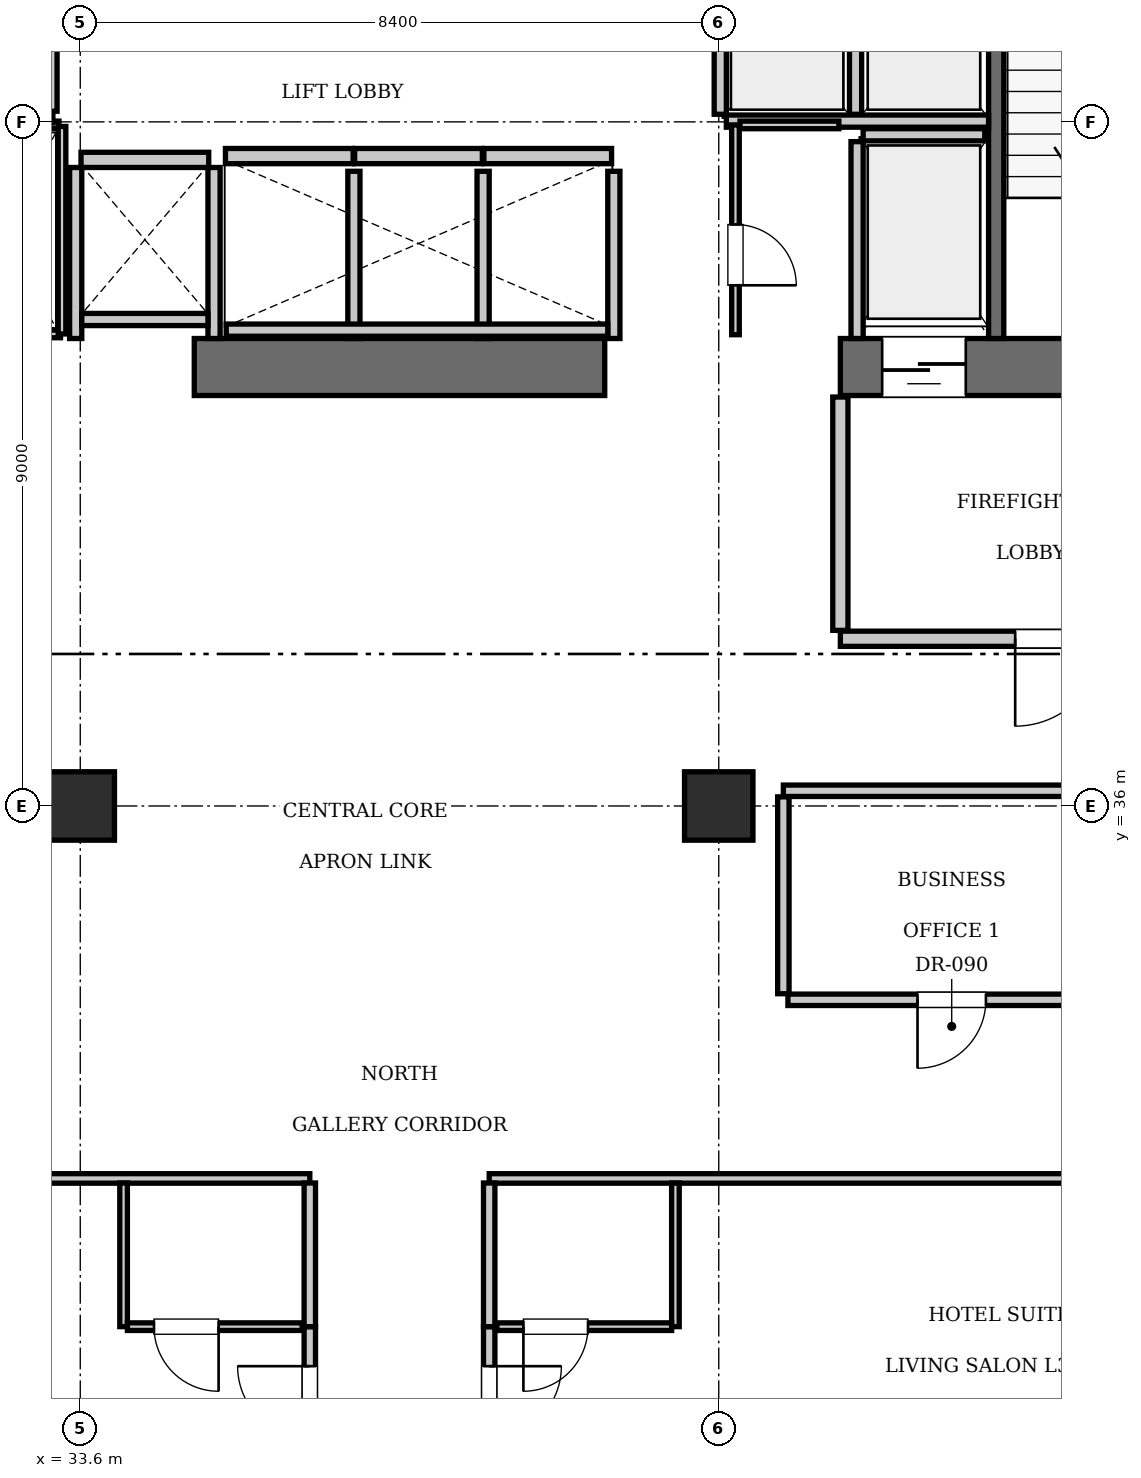
"""IFC4 building model, lengths in metres.
Left out: names, types, materials, properties, quantities, classifications, styles, units other than length and angle.
Written with IfcOpenShell. Run it as: python <this file> out.ifc"""

import sys

from ifc_helpers import new_model, si_unit, direction, frame, frame_2d, origin, origin_2d, place, context, subcontext, project, spatial, rectangle, extrude, element, fill, save


model = new_model("IFC4")
c1 = context("Model", 3, precision=1e-05, world=origin(), true_north=direction((0.0, 1.0)))
c2 = subcontext(c1, "Body", "Model", "MODEL_VIEW")
j1 = project(units=[si_unit("LENGTHUNIT", "METRE"), si_unit("PLANEANGLEUNIT", "RADIAN")], contexts=[c1])
p1 = place(None, origin())
s1 = spatial("IfcSite", under=j1, at=p1, CompositionType="ELEMENT")
p2 = place(p1, origin())
s2 = spatial("IfcBuilding", under=s1, at=p2, CompositionType="ELEMENT")
p3 = place(p2, frame((0.0, 0.0, 131.25)))
s3 = spatial("IfcBuildingStorey", under=s2, at=p3, CompositionType="ELEMENT", Elevation=131.25)
p4 = place(p3, frame((35.1, 41.775, 0.0), z_axis=(0.0, 0.0, 1.0), x_axis=(1.0, 0.0, 0.0)))
e1 = element("IfcWall", 1, at=p4, inside=s3, PredefinedType="SHEAR", context=c2, shape_type="SweptSolid", body=[
    extrude(rectangle(XDim=5.4, YDim=0.75, at=frame_2d((2.7, 0.0))), origin(), (0.0, 0.0, 1.0), 3.85),
])
p5 = place(p3, frame((43.6, 41.775, 0.0), z_axis=(0.0, 0.0, 1.0), x_axis=(1.0, 0.0, 0.0)))
e2 = element("IfcWall", 2, at=p5, inside=s3, PredefinedType="SHEAR", context=c2, shape_type="SweptSolid", body=[
    extrude(rectangle(XDim=6.8, YDim=0.75, at=frame_2d((3.4, 0.0))), origin(), (0.0, 0.0, 1.0), 3.85),
])
p6 = place(p5, frame((3.9, 0.0, 0.0)))
e3 = element("IfcOpeningElement", 3, at=p6, cuts=e2, PredefinedType="OPENING", context=c2, shape_type="SweptSolid", body=[
    extrude(rectangle(XDim=1.15, YDim=2.15, at=frame_2d((0.575, 1.075))), frame((0.0, 0.385, 0.0), z_axis=(0.0, -1.0, 0.0), x_axis=(1.0, 0.0, 0.0)), (0.0, 0.0, 1.0), 0.77),
])
p7 = place(p5, frame((0.55, 0.0, 0.0)))
e4 = element("IfcOpeningElement", 4, at=p7, cuts=e2, PredefinedType="OPENING", context=c2, shape_type="SweptSolid", body=[
    extrude(rectangle(XDim=1.1, YDim=2.2, at=frame_2d((0.55, 1.1))), frame((0.0, 0.385, 0.0), z_axis=(0.0, -1.0, 0.0), x_axis=(1.0, 0.0, 0.0)), (0.0, 0.0, 1.0), 0.77),
])
for number, where, z_axis, x_axis in (
    (5, (33.6, 36.0, 0.0), (0.0, 0.0, 1.0), (1.0, 0.0, 0.0)),
    (6, (42.0, 36.0, 0.0), (0.0, 0.0, 1.0), (1.0, 0.0, 0.0)),
):
    element("IfcColumn", number, at=place(p3, frame(where, z_axis=z_axis, x_axis=x_axis)), inside=s3, PredefinedType="COLUMN", context=c2, shape_type="SweptSolid", body=[
        extrude(rectangle(XDim=0.9, YDim=0.9, at=origin_2d()), origin(), (0.0, 0.0, 1.0), 3.85),
    ])
p8 = place(p3, frame((45.65, 42.15, 0.0), z_axis=(0.0, 0.0, 1.0), x_axis=(0.0, 1.0, 0.0)))
e7 = element("IfcWall", 7, at=p8, inside=s3, PredefinedType="SOLIDWALL", context=c2, shape_type="SweptSolid", body=[
    extrude(rectangle(XDim=9.0, YDim=0.2, at=frame_2d((4.5, 0.0))), origin(), (0.0, 0.0, 1.0), 3.61),
])
for number, where, z_axis, x_axis in (
    (8, (35.51, 44.55, 0.0), (0.0, 0.0, 1.0), (1.0, 0.0, 0.0)),
    (9, (37.21, 44.55, 0.0), (0.0, 0.0, 1.0), (1.0, 0.0, 0.0)),
):
    element("IfcWall", number, at=place(p3, frame(where, z_axis=z_axis, x_axis=x_axis)), inside=s3, PredefinedType="SOLIDWALL", context=c2, shape_type="SweptSolid", body=[
        extrude(rectangle(XDim=1.68, YDim=0.2, at=frame_2d((0.84, 0.0))), origin(), (0.0, 0.0, 1.0), 3.61),
    ])
p9 = place(p3, frame((38.91, 44.55, 0.0), z_axis=(0.0, 0.0, 1.0), x_axis=(1.0, 0.0, 0.0)))
e10 = element("IfcWall", 10, at=p9, inside=s3, PredefinedType="SOLIDWALL", context=c2, shape_type="SweptSolid", body=[
    extrude(rectangle(XDim=1.68, YDim=0.2, at=frame_2d((0.84, 0.0))), origin(), (0.0, 0.0, 1.0), 3.61),
])
p10 = place(p3, frame((33.61, 44.5, 0.0), z_axis=(0.0, 0.0, 1.0), x_axis=(1.0, 0.0, 0.0)))
e11 = element("IfcWall", 11, at=p10, inside=s3, PredefinedType="SOLIDWALL", context=c2, shape_type="SweptSolid", body=[
    extrude(rectangle(XDim=1.68, YDim=0.2, at=frame_2d((0.84, 0.0))), origin(), (0.0, 0.0, 1.0), 3.61),
])
p11 = place(p3, frame((43.9, 44.83, 0.0), z_axis=(0.0, 0.0, 1.0), x_axis=(1.0, 0.0, 0.0)))
e12 = element("IfcWall", 12, at=p11, inside=s3, PredefinedType="SOLIDWALL", context=c2, shape_type="SweptSolid", body=[
    extrude(rectangle(XDim=1.6, YDim=0.16, at=frame_2d((0.8, 0.0))), origin(), (0.0, 0.0, 1.0), 3.61),
])
p12 = place(p3, frame((43.82, 42.15, 0.0), z_axis=(0.0, 0.0, 1.0), x_axis=(0.0, 1.0, 0.0)))
e13 = element("IfcWall", 13, at=p12, inside=s3, PredefinedType="SOLIDWALL", context=c2, shape_type="SweptSolid", body=[
    extrude(rectangle(XDim=2.59, YDim=0.16, at=frame_2d((1.295, 0.0))), origin(), (0.0, 0.0, 1.0), 3.61),
])
for number, where, z_axis, x_axis in (
    (14, (42.02, 45.1, 0.0), (0.0, 0.0, 1.0), (0.0, 1.0, 0.0)),
    (15, (43.8, 45.1, 0.0), (0.0, 0.0, 1.0), (0.0, 1.0, 0.0)),
):
    element("IfcWall", number, at=place(p3, frame(where, z_axis=z_axis, x_axis=x_axis)), inside=s3, PredefinedType="SOLIDWALL", context=c2, shape_type="SweptSolid", body=[
        extrude(rectangle(XDim=1.95, YDim=0.16, at=frame_2d((0.975, 0.0))), origin(), (0.0, 0.0, 1.0), 3.61),
    ])
p13 = place(p3, frame((42.1, 45.01, 0.0), z_axis=(0.0, 0.0, 1.0), x_axis=(1.0, 0.0, 0.0)))
e16 = element("IfcWall", 16, at=p13, inside=s3, PredefinedType="SOLIDWALL", context=c2, shape_type="SweptSolid", body=[
    extrude(rectangle(XDim=3.45, YDim=0.16, at=frame_2d((1.725, 0.0))), origin(), (0.0, 0.0, 1.0), 3.61),
])
for number, where, z_axis, x_axis in (
    (17, (37.2, 42.15, 0.0), (0.0, 0.0, 1.0), (0.0, 1.0, 0.0)),
    (18, (38.9, 42.15, 0.0), (0.0, 0.0, 1.0), (0.0, 1.0, 0.0)),
    (19, (40.62, 42.15, 0.0), (0.0, 0.0, 1.0), (0.0, 1.0, 0.0)),
):
    element("IfcWall", number, at=place(p3, frame(where, z_axis=z_axis, x_axis=x_axis)), inside=s3, PredefinedType="SOLIDWALL", context=c2, shape_type="SweptSolid", body=[
        extrude(rectangle(XDim=2.2, YDim=0.16, at=frame_2d((1.1, 0.0))), origin(), (0.0, 0.0, 1.0), 3.61),
    ])
p14 = place(p3, frame((35.52, 42.26, 0.0), z_axis=(0.0, 0.0, 1.0), x_axis=(1.0, 0.0, 0.0)))
e20 = element("IfcWall", 20, at=p14, inside=s3, PredefinedType="SOLIDWALL", context=c2, shape_type="SweptSolid", body=[
    extrude(rectangle(XDim=5.02, YDim=0.16, at=frame_2d((2.51, 0.0))), origin(), (0.0, 0.0, 1.0), 3.61),
])
for number, where, z_axis, x_axis in (
    (21, (33.54, 42.15, 0.0), (0.0, 0.0, 1.0), (0.0, 1.0, 0.0)),
    (22, (35.36, 42.15, 0.0), (0.0, 0.0, 1.0), (0.0, 1.0, 0.0)),
):
    element("IfcWall", number, at=place(p3, frame(where, z_axis=z_axis, x_axis=x_axis)), inside=s3, PredefinedType="SOLIDWALL", context=c2, shape_type="SweptSolid", body=[
        extrude(rectangle(XDim=2.25, YDim=0.16, at=frame_2d((1.125, 0.0))), origin(), (0.0, 0.0, 1.0), 3.61),
    ])
p15 = place(p3, frame((33.62, 42.4, 0.0), z_axis=(0.0, 0.0, 1.0), x_axis=(1.0, 0.0, 0.0)))
e23 = element("IfcWall", 23, at=p15, inside=s3, PredefinedType="SOLIDWALL", context=c2, shape_type="SweptSolid", body=[
    extrude(rectangle(XDim=1.66, YDim=0.16, at=frame_2d((0.83, 0.0))), origin(), (0.0, 0.0, 1.0), 3.61),
])
p16 = place(p3, frame((43.6, 38.2, 0.0), z_axis=(0.0, 0.0, 1.0), x_axis=(1.0, 0.0, 0.0)))
e24 = element("IfcWall", 24, at=p16, inside=s3, PredefinedType="PARTITIONING", context=c2, shape_type="SweptSolid", body=[
    extrude(rectangle(XDim=5.8, YDim=0.2, at=frame_2d((2.9, 0.0))), origin(), (0.0, 0.0, 1.0), 3.61),
])
p17 = place(p16, frame((2.3, 0.0, 0.0)))
e25 = element("IfcOpeningElement", 25, at=p17, cuts=e24, PredefinedType="OPENING", context=c2, shape_type="SweptSolid", body=[
    extrude(rectangle(XDim=1.15, YDim=2.15, at=frame_2d((0.575, 1.075))), frame((0.0, 0.11, 0.0), z_axis=(0.0, -1.0, 0.0), x_axis=(1.0, 0.0, 0.0)), (0.0, 0.0, 1.0), 0.22),
])
p18 = place(p3, frame((43.6, 38.31, 0.0), z_axis=(0.0, 0.0, 1.0), x_axis=(0.0, 1.0, 0.0)))
e26 = element("IfcWall", 26, at=p18, inside=s3, PredefinedType="PARTITIONING", context=c2, shape_type="SweptSolid", body=[
    extrude(rectangle(XDim=3.07, YDim=0.2, at=frame_2d((1.535, 0.0))), origin(), (0.0, 0.0, 1.0), 3.61),
])
p19 = place(p3, frame((32.02, 42.21, 0.0), z_axis=(0.0, 0.0, 1.0), x_axis=(1.0, 0.0, 0.0)))
e27 = element("IfcWall", 27, at=p19, inside=s3, PredefinedType="PARTITIONING", context=c2, shape_type="SweptSolid", body=[
    extrude(rectangle(XDim=1.32, YDim=0.1, at=frame_2d((0.66, 0.0))), origin(), (0.0, 0.0, 1.0), 3.61),
])
p20 = place(p19, frame((0.24, 0.0, 0.0)))
e28 = element("IfcOpeningElement", 28, at=p20, cuts=e27, PredefinedType="OPENING", context=c2, shape_type="SweptSolid", body=[
    extrude(rectangle(XDim=0.8, YDim=2.05, at=frame_2d((0.4, 1.025))), frame((0.0, 0.06, 0.0), z_axis=(0.0, -1.0, 0.0), x_axis=(1.0, 0.0, 0.0)), (0.0, 0.0, 1.0), 0.12),
])
p21 = place(p3, frame((31.84, 44.96, 0.0), z_axis=(0.0, 0.0, 1.0), x_axis=(1.0, 0.0, 0.0)))
e29 = element("IfcWall", 29, at=p21, inside=s3, PredefinedType="PARTITIONING", context=c2, shape_type="SweptSolid", body=[
    extrude(rectangle(XDim=1.48, YDim=0.1, at=frame_2d((0.74, 0.0))), origin(), (0.0, 0.0, 1.0), 3.61),
])
p22 = place(p3, frame((33.36, 42.21, 0.0), z_axis=(0.0, 0.0, 1.0), x_axis=(0.0, 1.0, 0.0)))
e30 = element("IfcWall", 30, at=p22, inside=s3, PredefinedType="PARTITIONING", context=c2, shape_type="SweptSolid", body=[
    extrude(rectangle(XDim=2.73, YDim=0.1, at=frame_2d((1.365, 0.0))), origin(), (0.0, 0.0, 1.0), 3.61),
])
p23 = place(p3, frame((42.22, 42.2, 0.0), z_axis=(0.0, 0.0, 1.0), x_axis=(0.0, 1.0, 0.0)))
e31 = element("IfcWall", 31, at=p23, inside=s3, PredefinedType="PARTITIONING", context=c2, shape_type="SweptSolid", body=[
    extrude(rectangle(XDim=2.76, YDim=0.1, at=frame_2d((1.38, 0.0))), origin(), (0.0, 0.0, 1.0), 3.61),
])
p24 = place(p23, frame((0.65, 0.0, 0.0)))
e32 = element("IfcOpeningElement", 32, at=p24, cuts=e31, PredefinedType="OPENING", context=c2, shape_type="SweptSolid", body=[
    extrude(rectangle(XDim=0.8, YDim=2.05, at=frame_2d((0.4, 1.025))), frame((0.0, 0.06, 0.0), z_axis=(0.0, -1.0, 0.0), x_axis=(1.0, 0.0, 0.0)), (0.0, 0.0, 1.0), 0.12),
])
p25 = place(p3, frame((42.28, 44.96, 0.0), z_axis=(0.0, 0.0, 1.0), x_axis=(1.0, 0.0, 0.0)))
e33 = element("IfcWall", 33, at=p25, inside=s3, PredefinedType="PARTITIONING", context=c2, shape_type="SweptSolid", body=[
    extrude(rectangle(XDim=1.3, YDim=0.1, at=frame_2d((0.65, 0.0))), origin(), (0.0, 0.0, 1.0), 3.61),
])
p26 = place(p3, frame((30.06, 45.06, 0.0), z_axis=(0.0, 0.0, 1.0), x_axis=(1.0, 0.0, 0.0)))
e34 = element("IfcWall", 34, at=p26, inside=s3, PredefinedType="PARTITIONING", context=c2, shape_type="SweptSolid", body=[
    extrude(rectangle(XDim=3.18, YDim=0.15, at=frame_2d((1.59, 0.0))), origin(), (0.0, 0.0, 1.0), 3.61),
])
p27 = place(p3, frame((33.22, 45.14, 0.0), z_axis=(0.0, 0.0, 1.0), x_axis=(0.0, 1.0, 0.0)))
e35 = element("IfcWall", 35, at=p27, inside=s3, PredefinedType="PARTITIONING", context=c2, shape_type="SweptSolid", body=[
    extrude(rectangle(XDim=4.16, YDim=0.15, at=frame_2d((2.08, 0.0))), origin(), (0.0, 0.0, 1.0), 3.61),
])
p28 = place(p3, frame((42.85, 36.2, 0.0), z_axis=(0.0, 0.0, 1.0), x_axis=(1.0, 0.0, 0.0)))
e36 = element("IfcWall", 36, at=p28, inside=s3, PredefinedType="PARTITIONING", context=c2, shape_type="SweptSolid", body=[
    extrude(rectangle(XDim=4.43, YDim=0.15, at=frame_2d((2.215, 0.0))), origin(), (0.0, 0.0, 1.0), 3.61),
])
p29 = place(p3, frame((42.85, 33.53, 0.0), z_axis=(0.0, 0.0, 1.0), x_axis=(0.0, 1.0, 0.0)))
e37 = element("IfcWall", 37, at=p29, inside=s3, PredefinedType="PARTITIONING", context=c2, shape_type="SweptSolid", body=[
    extrude(rectangle(XDim=2.59, YDim=0.15, at=frame_2d((1.295, 0.0))), origin(), (0.0, 0.0, 1.0), 3.61),
])
p30 = place(p3, frame((42.91, 33.45, 0.0), z_axis=(0.0, 0.0, 1.0), x_axis=(1.0, 0.0, 0.0)))
e38 = element("IfcWall", 38, at=p30, inside=s3, PredefinedType="PARTITIONING", context=c2, shape_type="SweptSolid", body=[
    extrude(rectangle(XDim=4.31, YDim=0.15, at=frame_2d((2.155, 0.0))), origin(), (0.0, 0.0, 1.0), 3.61),
])
p31 = place(p30, frame((1.705, 0.0, 0.0)))
e39 = element("IfcOpeningElement", 39, at=p31, cuts=e38, PredefinedType="OPENING", context=c2, shape_type="SweptSolid", body=[
    extrude(rectangle(XDim=0.9, YDim=2.1, at=frame_2d((0.45, 1.05))), frame((0.0, 0.085, 0.0), z_axis=(0.0, -1.0, 0.0), x_axis=(1.0, 0.0, 0.0)), (0.0, 0.0, 1.0), 0.17),
])
p32 = place(p3, frame((13.2, 31.1, 0.0), z_axis=(0.0, 0.0, 1.0), x_axis=(1.0, 0.0, 0.0)))
e40 = element("IfcWall", 40, at=p32, inside=s3, PredefinedType="PARTITIONING", context=c2, shape_type="SweptSolid", body=[
    extrude(rectangle(XDim=23.42, YDim=0.125, at=frame_2d((11.71, 0.0))), origin(), (0.0, 0.0, 1.0), 3.61),
])
p33 = place(p3, frame((38.98, 31.1, 0.0), z_axis=(0.0, 0.0, 1.0), x_axis=(1.0, 0.0, 0.0)))
e41 = element("IfcWall", 41, at=p33, inside=s3, PredefinedType="PARTITIONING", context=c2, shape_type="SweptSolid", body=[
    extrude(rectangle(XDim=23.42, YDim=0.125, at=frame_2d((11.71, 0.0))), origin(), (0.0, 0.0, 1.0), 3.61),
])
p34 = place(p3, frame((36.62, 27.16, 0.0), z_axis=(0.0, 0.0, 1.0), x_axis=(0.0, 1.0, 0.0)))
e42 = element("IfcWall", 42, at=p34, inside=s3, PredefinedType="PARTITIONING", context=c2, shape_type="SweptSolid", body=[
    extrude(rectangle(XDim=1.99, YDim=0.15, at=frame_2d((0.995, 0.0))), origin(), (0.0, 0.0, 1.0), 3.61),
])
p35 = place(p34, frame((0.52, 0.0, 0.0)))
e43 = element("IfcOpeningElement", 43, at=p35, cuts=e42, PredefinedType="OPENING", context=c2, shape_type="SweptSolid", body=[
    extrude(rectangle(XDim=0.95, YDim=2.15, at=frame_2d((0.475, 1.075))), frame((0.0, 0.085, 0.0), z_axis=(0.0, -1.0, 0.0), x_axis=(1.0, 0.0, 0.0)), (0.0, 0.0, 1.0), 0.17),
])
p36 = place(p3, frame((36.62, 29.15, 0.0), z_axis=(0.0, 0.0, 1.0), x_axis=(0.0, 1.0, 0.0)))
e44 = element("IfcWall", 44, at=p36, inside=s3, PredefinedType="PARTITIONING", context=c2, shape_type="SweptSolid", body=[
    extrude(rectangle(XDim=1.89, YDim=0.15, at=frame_2d((0.945, 0.0))), origin(), (0.0, 0.0, 1.0), 3.61),
])
p37 = place(p3, frame((34.17, 29.15, 0.0), z_axis=(0.0, 0.0, 1.0), x_axis=(0.0, 1.0, 0.0)))
e45 = element("IfcWall", 45, at=p37, inside=s3, PredefinedType="PARTITIONING", context=c2, shape_type="SweptSolid", body=[
    extrude(rectangle(XDim=1.89, YDim=0.1, at=frame_2d((0.945, 0.0))), origin(), (0.0, 0.0, 1.0), 3.61),
])
p38 = place(p3, frame((34.22, 29.15, 0.0), z_axis=(0.0, 0.0, 1.0), x_axis=(1.0, 0.0, 0.0)))
e46 = element("IfcWall", 46, at=p38, inside=s3, PredefinedType="PARTITIONING", context=c2, shape_type="SweptSolid", body=[
    extrude(rectangle(XDim=2.3, YDim=0.1, at=frame_2d((1.15, 0.0))), origin(), (0.0, 0.0, 1.0), 3.61),
])
p39 = place(p38, frame((0.35, 0.0, 0.0)))
e47 = element("IfcOpeningElement", 47, at=p39, cuts=e46, PredefinedType="OPENING", context=c2, shape_type="SweptSolid", body=[
    extrude(rectangle(XDim=0.85, YDim=2.1, at=frame_2d((0.425, 1.05))), frame((0.0, 0.06, 0.0), z_axis=(0.0, -1.0, 0.0), x_axis=(1.0, 0.0, 0.0)), (0.0, 0.0, 1.0), 0.12),
])
p40 = place(p3, frame((38.98, 27.16, 0.0), z_axis=(0.0, 0.0, 1.0), x_axis=(0.0, 1.0, 0.0)))
e48 = element("IfcWall", 48, at=p40, inside=s3, PredefinedType="PARTITIONING", context=c2, shape_type="SweptSolid", body=[
    extrude(rectangle(XDim=1.99, YDim=0.15, at=frame_2d((0.995, 0.0))), origin(), (0.0, 0.0, 1.0), 3.61),
])
p41 = place(p40, frame((0.52, 0.0, 0.0)))
e49 = element("IfcOpeningElement", 49, at=p41, cuts=e48, PredefinedType="OPENING", context=c2, shape_type="SweptSolid", body=[
    extrude(rectangle(XDim=0.95, YDim=2.15, at=frame_2d((0.475, 1.075))), frame((0.0, 0.085, 0.0), z_axis=(0.0, -1.0, 0.0), x_axis=(1.0, 0.0, 0.0)), (0.0, 0.0, 1.0), 0.17),
])
p42 = place(p3, frame((38.98, 29.15, 0.0), z_axis=(0.0, 0.0, 1.0), x_axis=(0.0, 1.0, 0.0)))
e50 = element("IfcWall", 50, at=p42, inside=s3, PredefinedType="PARTITIONING", context=c2, shape_type="SweptSolid", body=[
    extrude(rectangle(XDim=1.89, YDim=0.15, at=frame_2d((0.945, 0.0))), origin(), (0.0, 0.0, 1.0), 3.61),
])
p43 = place(p3, frame((41.43, 29.15, 0.0), z_axis=(0.0, 0.0, 1.0), x_axis=(0.0, 1.0, 0.0)))
e51 = element("IfcWall", 51, at=p43, inside=s3, PredefinedType="PARTITIONING", context=c2, shape_type="SweptSolid", body=[
    extrude(rectangle(XDim=1.89, YDim=0.1, at=frame_2d((0.945, 0.0))), origin(), (0.0, 0.0, 1.0), 3.61),
])
p44 = place(p3, frame((39.08, 29.15, 0.0), z_axis=(0.0, 0.0, 1.0), x_axis=(1.0, 0.0, 0.0)))
e52 = element("IfcWall", 52, at=p44, inside=s3, PredefinedType="PARTITIONING", context=c2, shape_type="SweptSolid", body=[
    extrude(rectangle(XDim=2.3, YDim=0.1, at=frame_2d((1.15, 0.0))), origin(), (0.0, 0.0, 1.0), 3.61),
])
p45 = place(p44, frame((0.35, 0.0, 0.0)))
e53 = element("IfcOpeningElement", 53, at=p45, cuts=e52, PredefinedType="OPENING", context=c2, shape_type="SweptSolid", body=[
    extrude(rectangle(XDim=0.85, YDim=2.1, at=frame_2d((0.425, 1.05))), frame((0.0, 0.06, 0.0), z_axis=(0.0, -1.0, 0.0), x_axis=(1.0, 0.0, 0.0)), (0.0, 0.0, 1.0), 0.12),
])
p46 = place(p7, frame((1.1, 0.0, 0.0), z_axis=(0.0, 0.0, 1.0), x_axis=(-1.0, 0.0, 0.0)))
e54 = element("IfcDoor", 54, at=p46, inside=s3, OperationType="SLIDING_TO_LEFT", PredefinedType="DOOR", context=c2, shape_type="SweptSolid", body=[
    extrude(rectangle(XDim=1.1, YDim=2.2, at=frame_2d((0.55, 1.1))), frame((0.0, 0.025, 0.0), z_axis=(0.0, -1.0, 0.0), x_axis=(1.0, 0.0, 0.0)), (0.0, 0.0, 1.0), 0.05),
])
fill(e4, e54)
p47 = place(p17, frame((1.15, 0.0, 0.0), z_axis=(0.0, 0.0, 1.0), x_axis=(-1.0, 0.0, 0.0)))
e55 = element("IfcDoor", 55, at=p47, inside=s3, OperationType="SINGLE_SWING_RIGHT", PredefinedType="DOOR", context=c2, shape_type="SweptSolid", body=[
    extrude(rectangle(XDim=1.15, YDim=2.15, at=frame_2d((0.575, 1.075))), frame((0.0, 0.025, 0.0), z_axis=(0.0, -1.0, 0.0), x_axis=(1.0, 0.0, 0.0)), (0.0, 0.0, 1.0), 0.05),
])
fill(e25, e55)
p48 = place(p24, frame((0.8, 0.0, 0.0), z_axis=(0.0, 0.0, 1.0), x_axis=(-1.0, 0.0, 0.0)))
e56 = element("IfcDoor", 56, at=p48, inside=s3, OperationType="SINGLE_SWING_RIGHT", PredefinedType="DOOR", context=c2, shape_type="SweptSolid", body=[
    extrude(rectangle(XDim=0.8, YDim=2.05, at=frame_2d((0.4, 1.025))), frame((0.0, 0.025, 0.0), z_axis=(0.0, -1.0, 0.0), x_axis=(1.0, 0.0, 0.0)), (0.0, 0.0, 1.0), 0.05),
])
fill(e32, e56)
p49 = place(p31, frame((0.9, 0.0, 0.0), z_axis=(0.0, 0.0, 1.0), x_axis=(-1.0, 0.0, 0.0)))
e57 = element("IfcDoor", 57, at=p49, inside=s3, OperationType="SINGLE_SWING_RIGHT", PredefinedType="DOOR", context=c2, shape_type="SweptSolid", body=[
    extrude(rectangle(XDim=0.9, YDim=2.1, at=frame_2d((0.45, 1.05))), frame((0.0, 0.025, 0.0), z_axis=(0.0, -1.0, 0.0), x_axis=(1.0, 0.0, 0.0)), (0.0, 0.0, 1.0), 0.05),
])
fill(e39, e57)
p50 = place(p39, frame((0.85, 0.0, 0.0), z_axis=(0.0, 0.0, 1.0), x_axis=(-1.0, 0.0, 0.0)))
e58 = element("IfcDoor", 58, at=p50, inside=s3, OperationType="SINGLE_SWING_LEFT", PredefinedType="DOOR", context=c2, shape_type="SweptSolid", body=[
    extrude(rectangle(XDim=0.85, YDim=2.1, at=frame_2d((0.425, 1.05))), frame((0.0, 0.025, 0.0), z_axis=(0.0, -1.0, 0.0), x_axis=(1.0, 0.0, 0.0)), (0.0, 0.0, 1.0), 0.05),
])
fill(e47, e58)
p51 = place(p35, origin())
e59 = element("IfcDoor", 59, at=p51, inside=s3, OperationType="SINGLE_SWING_RIGHT", PredefinedType="DOOR", context=c2, shape_type="SweptSolid", body=[
    extrude(rectangle(XDim=0.95, YDim=2.15, at=frame_2d((0.475, 1.075))), frame((0.0, 0.025, 0.0), z_axis=(0.0, -1.0, 0.0), x_axis=(1.0, 0.0, 0.0)), (0.0, 0.0, 1.0), 0.05),
])
fill(e43, e59)
p52 = place(p45, frame((0.85, 0.0, 0.0), z_axis=(0.0, 0.0, 1.0), x_axis=(-1.0, 0.0, 0.0)))
e60 = element("IfcDoor", 60, at=p52, inside=s3, OperationType="SINGLE_SWING_RIGHT", PredefinedType="DOOR", context=c2, shape_type="SweptSolid", body=[
    extrude(rectangle(XDim=0.85, YDim=2.1, at=frame_2d((0.425, 1.05))), frame((0.0, 0.025, 0.0), z_axis=(0.0, -1.0, 0.0), x_axis=(1.0, 0.0, 0.0)), (0.0, 0.0, 1.0), 0.05),
])
fill(e53, e60)
p53 = place(p41, frame((0.95, 0.0, 0.0), z_axis=(0.0, 0.0, 1.0), x_axis=(-1.0, 0.0, 0.0)))
e61 = element("IfcDoor", 61, at=p53, inside=s3, OperationType="SINGLE_SWING_LEFT", PredefinedType="DOOR", context=c2, shape_type="SweptSolid", body=[
    extrude(rectangle(XDim=0.95, YDim=2.15, at=frame_2d((0.475, 1.075))), frame((0.0, 0.025, 0.0), z_axis=(0.0, -1.0, 0.0), x_axis=(1.0, 0.0, 0.0)), (0.0, 0.0, 1.0), 0.05),
])
fill(e49, e61)
save(model, sys.argv[1])
